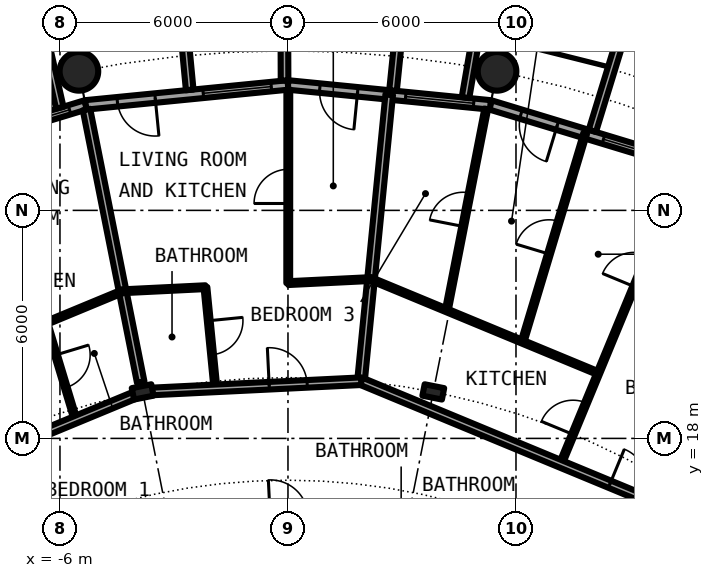
"""IFC4 building model, lengths in metres.
Left out: names, types, materials, properties, quantities, classifications, styles, units other than length and angle.
Written with IfcOpenShell. Run it as: python <this file> out.ifc"""

import sys

from ifc_helpers import new_model, si_unit, direction, frame, frame_2d, origin, origin_2d, place, context, subcontext, project, spatial, rectangle, circle, hollow_circle, i_section, extrude, element, fill, save


model = new_model("IFC4")
c1 = context("Model", 3, precision=1e-05, world=origin(), true_north=direction((0.0, 1.0)))
c2 = subcontext(c1, "Body", "Model", "MODEL_VIEW")
j1 = project(units=[si_unit("LENGTHUNIT", "METRE"), si_unit("PLANEANGLEUNIT", "RADIAN")], contexts=[c1])
p1 = place(None, origin())
s1 = spatial("IfcSite", under=j1, at=p1, CompositionType="ELEMENT")
p2 = place(p1, origin())
s2 = spatial("IfcBuilding", under=s1, at=p2, CompositionType="ELEMENT")
p3 = place(p2, frame((0.0, 0.0, 72.75)))
s3 = spatial("IfcBuildingStorey", under=s2, at=p3, CompositionType="ELEMENT", Elevation=72.75)
for number, where, z_axis, x_axis in (
    (1, (5.501, 27.658, 0.0), (0.0, 0.0, 1.0), (1.0, 0.0, 0.0)),
    (2, (-5.501, 27.658, 0.0), (0.0, 0.0, 1.0), (1.0, 0.0, 0.0)),
):
    element("IfcColumn", number, at=place(p3, frame(where, z_axis=z_axis, x_axis=x_axis)), inside=s3, PredefinedType="COLUMN", context=c2, shape_type="SweptSolid", body=[
        extrude(hollow_circle(Radius=0.508, WallThickness=0.04, at=origin_2d()), origin(), (0.0, 0.0, 1.0), 3.05),
    ])
for number, where, z_axis, x_axis in (
    (3, (3.824, 19.223, 0.0), (0.0, 0.0, 1.0), (0.195, 0.981, 0.0)),
    (4, (-3.824, 19.223, 0.0), (0.0, 0.0, 1.0), (-0.195, 0.981, 0.0)),
):
    element("IfcColumn", number, at=place(p3, frame(where, z_axis=z_axis, x_axis=x_axis)), inside=s3, PredefinedType="COLUMN", context=c2, shape_type="SweptSolid", body=[
        extrude(i_section(OverallWidth=0.306, OverallDepth=0.524, WebThickness=0.021, FlangeThickness=0.04, FilletRadius=0.027, at=origin_2d()), origin(), (0.0, 0.0, 1.0), 3.05),
    ])
p4 = place(p3, frame((10.447, 25.222, 0.0), z_axis=(0.0, 0.0, 1.0), x_axis=(-0.956965678721, 0.290201119486, 0.0)))
e5 = element("IfcWall", 5, at=p4, inside=s3, PredefinedType="SOLIDWALL", context=c2, shape_type="SweptSolid", body=[
    extrude(rectangle(XDim=5.351, YDim=0.25, at=frame_2d((2.676, 0.0))), origin(), (0.0, 0.0, 1.0), 2.7),
])
p5 = place(p4, frame((0.441, 0.0, 0.3)))
e6 = element("IfcOpeningElement", 6, at=p5, cuts=e5, PredefinedType="OPENING", context=c2, shape_type="SweptSolid", body=[
    extrude(rectangle(XDim=1.8, YDim=2.1, at=frame_2d((0.9, 1.05))), frame((0.0, 0.135, 0.0), z_axis=(0.0, -1.0, 0.0), x_axis=(1.0, 0.0, 0.0)), (0.0, 0.0, 1.0), 0.27),
])
p6 = place(p4, frame((3.51, 0.0, 0.0)))
e7 = element("IfcOpeningElement", 7, at=p6, cuts=e5, PredefinedType="OPENING", context=c2, shape_type="SweptSolid", body=[
    extrude(rectangle(XDim=1.0, YDim=2.2, at=frame_2d((0.5, 1.1))), frame((0.0, 0.135, 0.0), z_axis=(0.0, -1.0, 0.0), x_axis=(1.0, 0.0, 0.0)), (0.0, 0.0, 1.0), 0.27),
])
p7 = place(p3, frame((11.638, 28.084, -0.03), z_axis=(0.0, 0.0, 1.0), x_axis=(-0.941461077774, 0.337121697664, 0.0)))
e8 = element("IfcWall", 8, at=p7, inside=s3, PredefinedType="SOLIDWALL", context=c2, shape_type="SweptSolid", body=[
    extrude(rectangle(XDim=2.993, YDim=0.2, at=frame_2d((1.497, 0.0))), origin(), (0.0, 0.0, 1.0), 2.73),
])
p8 = place(p7, frame((0.457, 0.0, 0.33)))
e9 = element("IfcOpeningElement", 9, at=p8, cuts=e8, PredefinedType="OPENING", context=c2, shape_type="SweptSolid", body=[
    extrude(circle(Radius=1.04, at=frame_2d((1.04, 1.04))), frame((0.0, 0.11, 0.0), z_axis=(0.0, -1.0, 0.0), x_axis=(1.0, 0.0, 0.0)), (0.0, 0.0, 1.0), 0.22),
])
p9 = place(p3, frame((8.009, 26.092, -0.03), z_axis=(0.0, 0.0, 1.0), x_axis=(0.293406695073, 0.955987715029, 0.0)))
e10 = element("IfcWall", 10, at=p9, inside=s3, PredefinedType="SOLIDWALL", context=c2, shape_type="SweptSolid", body=[
    extrude(rectangle(XDim=3.006, YDim=0.2, at=frame_2d((1.503, 0.0))), origin(), (0.0, 0.0, 1.0), 2.73),
])
p10 = place(p3, frame((5.326, 26.775, 0.0), z_axis=(0.0, 0.0, 1.0), x_axis=(-0.995173996315, 0.098126026407, 0.0)))
e11 = element("IfcWall", 11, at=p10, inside=s3, PredefinedType="SOLIDWALL", context=c2, shape_type="SweptSolid", body=[
    extrude(rectangle(XDim=5.352, YDim=0.25, at=frame_2d((2.676, 0.0))), origin(), (0.0, 0.0, 1.0), 2.7),
])
p11 = place(p10, frame((0.441, 0.0, 0.3)))
e12 = element("IfcOpeningElement", 12, at=p11, cuts=e11, PredefinedType="OPENING", context=c2, shape_type="SweptSolid", body=[
    extrude(rectangle(XDim=1.8, YDim=2.1, at=frame_2d((0.9, 1.05))), frame((0.0, 0.135, 0.0), z_axis=(0.0, -1.0, 0.0), x_axis=(1.0, 0.0, 0.0)), (0.0, 0.0, 1.0), 0.27),
])
p12 = place(p10, frame((3.51, 0.0, 0.0)))
e13 = element("IfcOpeningElement", 13, at=p12, cuts=e11, PredefinedType="OPENING", context=c2, shape_type="SweptSolid", body=[
    extrude(rectangle(XDim=1.0, YDim=2.2, at=frame_2d((0.5, 1.1))), frame((0.0, 0.135, 0.0), z_axis=(0.0, -1.0, 0.0), x_axis=(1.0, 0.0, 0.0)), (0.0, 0.0, 1.0), 0.27),
])
p13 = place(p3, frame((4.671, 26.966, -0.03), z_axis=(0.0, 0.0, 1.0), x_axis=(0.170539878907, 0.985350774954, 0.0)))
e14 = element("IfcWall", 14, at=p13, inside=s3, PredefinedType="SOLIDWALL", context=c2, shape_type="SweptSolid", body=[
    extrude(rectangle(XDim=2.932, YDim=0.2, at=frame_2d((1.466, 0.0))), origin(), (0.0, 0.0, 1.0), 2.73),
])
p14 = place(p3, frame((2.764, 27.153, -0.03), z_axis=(0.0, 0.0, 1.0), x_axis=(0.101505487237, 0.994834979311, 0.0)))
e15 = element("IfcWall", 15, at=p14, inside=s3, PredefinedType="SOLIDWALL", context=c2, shape_type="SweptSolid", body=[
    extrude(rectangle(XDim=3.007, YDim=0.2, at=frame_2d((1.503, 0.0))), origin(), (0.0, 0.0, 1.0), 2.73),
])
p15 = place(p3, frame((0.0, 27.3, 0.0), z_axis=(0.0, 0.0, 1.0), x_axis=(-0.995173996315, -0.098126026407, 0.0)))
e16 = element("IfcWall", 16, at=p15, inside=s3, PredefinedType="SOLIDWALL", context=c2, shape_type="SweptSolid", body=[
    extrude(rectangle(XDim=5.352, YDim=0.25, at=frame_2d((2.676, 0.0))), origin(), (0.0, 0.0, 1.0), 2.7),
])
p16 = place(p15, frame((0.441, 0.0, 0.3)))
e17 = element("IfcOpeningElement", 17, at=p16, cuts=e16, PredefinedType="OPENING", context=c2, shape_type="SweptSolid", body=[
    extrude(rectangle(XDim=1.8, YDim=2.1, at=frame_2d((0.9, 1.05))), frame((0.0, 0.135, 0.0), z_axis=(0.0, -1.0, 0.0), x_axis=(1.0, 0.0, 0.0)), (0.0, 0.0, 1.0), 0.27),
])
p17 = place(p15, frame((3.51, 0.0, 0.0)))
e18 = element("IfcOpeningElement", 18, at=p17, cuts=e16, PredefinedType="OPENING", context=c2, shape_type="SweptSolid", body=[
    extrude(rectangle(XDim=1.0, YDim=2.2, at=frame_2d((0.5, 1.1))), frame((0.0, 0.135, 0.0), z_axis=(0.0, -1.0, 0.0), x_axis=(1.0, 0.0, 0.0)), (0.0, 0.0, 1.0), 0.27),
])
p18 = place(p3, frame((-0.09, 27.417, -0.03), z_axis=(0.0, 0.0, 1.0), x_axis=(-0.00347308367, 0.999993968827, 0.0)))
e19 = element("IfcWall", 19, at=p18, inside=s3, PredefinedType="SOLIDWALL", context=c2, shape_type="SweptSolid", body=[
    extrude(rectangle(XDim=2.882, YDim=0.2, at=frame_2d((1.441, 0.0))), origin(), (0.0, 0.0, 1.0), 2.73),
])
p19 = place(p3, frame((-2.586, 27.171, -0.03), z_axis=(0.0, 0.0, 1.0), x_axis=(-0.094548432284, 0.995520262954, 0.0)))
e20 = element("IfcWall", 20, at=p19, inside=s3, PredefinedType="SOLIDWALL", context=c2, shape_type="SweptSolid", body=[
    extrude(rectangle(XDim=3.006, YDim=0.2, at=frame_2d((1.503, 0.0))), origin(), (0.0, 0.0, 1.0), 2.73),
])
p20 = place(p3, frame((-5.326, 26.775, 0.0), z_axis=(0.0, 0.0, 1.0), x_axis=(-0.956965678721, -0.290201119486, 0.0)))
e21 = element("IfcWall", 21, at=p20, inside=s3, PredefinedType="SOLIDWALL", context=c2, shape_type="SweptSolid", body=[
    extrude(rectangle(XDim=5.351, YDim=0.25, at=frame_2d((2.676, 0.0))), origin(), (0.0, 0.0, 1.0), 2.7),
])
p21 = place(p20, frame((0.441, 0.0, 0.3)))
e22 = element("IfcOpeningElement", 22, at=p21, cuts=e21, PredefinedType="OPENING", context=c2, shape_type="SweptSolid", body=[
    extrude(rectangle(XDim=1.8, YDim=2.1, at=frame_2d((0.9, 1.05))), frame((0.0, 0.135, 0.0), z_axis=(0.0, -1.0, 0.0), x_axis=(1.0, 0.0, 0.0)), (0.0, 0.0, 1.0), 0.27),
])
p22 = place(p20, frame((3.51, 0.0, 0.0)))
e23 = element("IfcOpeningElement", 23, at=p22, cuts=e21, PredefinedType="OPENING", context=c2, shape_type="SweptSolid", body=[
    extrude(rectangle(XDim=1.0, YDim=2.2, at=frame_2d((0.5, 1.1))), frame((0.0, 0.135, 0.0), z_axis=(0.0, -1.0, 0.0), x_axis=(1.0, 0.0, 0.0)), (0.0, 0.0, 1.0), 0.27),
])
p23 = place(p3, frame((-6.004, 26.7, -0.03), z_axis=(0.0, 0.0, 1.0), x_axis=(-0.219609259383, 0.975587911566, 0.0)))
e24 = element("IfcWall", 24, at=p23, inside=s3, PredefinedType="SOLIDWALL", context=c2, shape_type="SweptSolid", body=[
    extrude(rectangle(XDim=2.933, YDim=0.2, at=frame_2d((1.466, 0.0))), origin(), (0.0, 0.0, 1.0), 2.73),
])
p24 = place(p3, frame((7.178, 17.328, 0.0), z_axis=(0.0, 0.0, 1.0), x_axis=(0.382458509789, 0.923972666419, 0.0)))
e25 = element("IfcWall", 25, at=p24, inside=s3, PredefinedType="PARTITIONING", context=c2, shape_type="SweptSolid", body=[
    extrude(rectangle(XDim=8.419, YDim=0.1, at=frame_2d((4.209, 0.0))), origin(), (0.0, 0.0, 1.0), 2.7),
])
p25 = place(p24, frame((0.841, 0.0, 0.0)))
e26 = element("IfcOpeningElement", 26, at=p25, cuts=e25, PredefinedType="OPENING", context=c2, shape_type="SweptSolid", body=[
    extrude(rectangle(XDim=0.9, YDim=2.3, at=frame_2d((0.45, 1.15))), frame((0.0, 0.06, 0.0), z_axis=(0.0, -1.0, 0.0), x_axis=(1.0, 0.0, 0.0)), (0.0, 0.0, 1.0), 0.12),
])
p26 = place(p24, frame((5.051, 0.0, 0.0)))
e27 = element("IfcOpeningElement", 27, at=p26, cuts=e25, PredefinedType="OPENING", context=c2, shape_type="SweptSolid", body=[
    extrude(rectangle(XDim=0.9, YDim=2.3, at=frame_2d((0.45, 1.15))), frame((0.0, 0.06, 0.0), z_axis=(0.0, -1.0, 0.0), x_axis=(1.0, 0.0, 0.0)), (0.0, 0.0, 1.0), 0.12),
])
p27 = place(p3, frame((-6.36, 21.039, 0.0), z_axis=(0.0, 0.0, 1.0), x_axis=(0.289375816213, -0.957215564537, 0.0)))
e28 = element("IfcWall", 28, at=p27, inside=s3, PredefinedType="PARTITIONING", context=c2, shape_type="SweptSolid", body=[
    extrude(rectangle(XDim=2.661, YDim=0.1, at=frame_2d((1.331, 0.0))), origin(), (0.0, 0.0, 1.0), 2.7),
])
p28 = place(p27, frame((0.88, 0.0, 0.0)))
e29 = element("IfcOpeningElement", 29, at=p28, cuts=e28, PredefinedType="OPENING", context=c2, shape_type="SweptSolid", body=[
    extrude(rectangle(XDim=0.9, YDim=2.3, at=frame_2d((0.45, 1.15))), frame((0.0, 0.06, 0.0), z_axis=(0.0, -1.0, 0.0), x_axis=(1.0, 0.0, 0.0)), (0.0, 0.0, 1.0), 0.12),
])
p29 = place(p3, frame((-5.302, 26.653, 0.0), z_axis=(0.0, 0.0, 1.0), x_axis=(0.195114589291, -0.98078045303, 0.0)))
e30 = element("IfcWall", 30, at=p29, inside=s3, PredefinedType="PARTITIONING", context=c2, shape_type="SweptSolid", body=[
    extrude(rectangle(XDim=7.314, YDim=0.2, at=frame_2d((3.657, 0.0))), origin(), (0.0, 0.0, 1.0), 2.7),
])
p30 = place(p3, frame((-2.172, 21.979, 0.0), z_axis=(0.0, 0.0, 1.0), x_axis=(0.098383180323, -0.995148606907, 0.0)))
e31 = element("IfcWall", 31, at=p30, inside=s3, PredefinedType="PARTITIONING", context=c2, shape_type="SweptSolid", body=[
    extrude(rectangle(XDim=2.675, YDim=0.1, at=frame_2d((1.337, 0.0))), origin(), (0.0, 0.0, 1.0), 2.7),
])
p31 = place(p30, frame((0.887, 0.0, 0.0)))
e32 = element("IfcOpeningElement", 32, at=p31, cuts=e31, PredefinedType="OPENING", context=c2, shape_type="SweptSolid", body=[
    extrude(rectangle(XDim=0.9, YDim=2.3, at=frame_2d((0.45, 1.15))), frame((0.0, 0.06, 0.0), z_axis=(0.0, -1.0, 0.0), x_axis=(1.0, 0.0, 0.0)), (0.0, 0.0, 1.0), 0.12),
])
p32 = place(p3, frame((0.007, 22.086, 0.0), z_axis=(0.0, 0.0, 1.0), x_axis=(0.000383785052, 0.999999926355, 0.0)))
e33 = element("IfcWall", 33, at=p32, inside=s3, PredefinedType="PARTITIONING", context=c2, shape_type="SweptSolid", body=[
    extrude(rectangle(XDim=5.089, YDim=0.1, at=frame_2d((2.544, 0.0))), origin(), (0.0, 0.0, 1.0), 2.7),
])
p33 = place(p32, frame((2.095, 0.0, 0.0)))
e34 = element("IfcOpeningElement", 34, at=p33, cuts=e33, PredefinedType="OPENING", context=c2, shape_type="SweptSolid", body=[
    extrude(rectangle(XDim=0.9, YDim=2.3, at=frame_2d((0.45, 1.15))), frame((0.0, 0.06, 0.0), z_axis=(0.0, -1.0, 0.0), x_axis=(1.0, 0.0, 0.0)), (0.0, 0.0, 1.0), 0.12),
])
p34 = place(p3, frame((1.921, 19.506, 0.0), z_axis=(0.0, 0.0, 1.0), x_axis=(0.098115395479, 0.995175044487, 0.0)))
e35 = element("IfcWall", 35, at=p34, inside=s3, PredefinedType="PARTITIONING", context=c2, shape_type="SweptSolid", body=[
    extrude(rectangle(XDim=7.574, YDim=0.2, at=frame_2d((3.787, 0.0))), origin(), (0.0, 0.0, 1.0), 2.7),
])
p35 = place(p3, frame((4.179, 21.367, 0.0), z_axis=(0.0, 0.0, 1.0), x_axis=(0.192109041462, 0.981373586453, 0.0)))
e36 = element("IfcWall", 36, at=p35, inside=s3, PredefinedType="PARTITIONING", context=c2, shape_type="SweptSolid", body=[
    extrude(rectangle(XDim=5.404, YDim=0.1, at=frame_2d((2.702, 0.0))), origin(), (0.0, 0.0, 1.0), 2.7),
])
p36 = place(p35, frame((2.252, 0.0, 0.0)))
e37 = element("IfcOpeningElement", 37, at=p36, cuts=e36, PredefinedType="OPENING", context=c2, shape_type="SweptSolid", body=[
    extrude(rectangle(XDim=0.9, YDim=2.3, at=frame_2d((0.45, 1.15))), frame((0.0, 0.06, 0.0), z_axis=(0.0, -1.0, 0.0), x_axis=(1.0, 0.0, 0.0)), (0.0, 0.0, 1.0), 0.12),
])
p37 = place(p3, frame((6.173, 20.541, 0.0), z_axis=(0.0, 0.0, 1.0), x_axis=(0.287793773423, 0.957692405723, 0.0)))
e38 = element("IfcWall", 38, at=p37, inside=s3, PredefinedType="PARTITIONING", context=c2, shape_type="SweptSolid", body=[
    extrude(rectangle(XDim=5.726, YDim=0.1, at=frame_2d((2.863, 0.0))), origin(), (0.0, 0.0, 1.0), 2.7),
])
p38 = place(p37, frame((2.413, 0.0, 0.0)))
e39 = element("IfcOpeningElement", 39, at=p38, cuts=e38, PredefinedType="OPENING", context=c2, shape_type="SweptSolid", body=[
    extrude(rectangle(XDim=0.9, YDim=2.3, at=frame_2d((0.45, 1.15))), frame((0.0, 0.06, 0.0), z_axis=(0.0, -1.0, 0.0), x_axis=(1.0, 0.0, 0.0)), (0.0, 0.0, 1.0), 0.12),
])
p39 = place(p3, frame((1.921, 19.506, 0.0), z_axis=(0.0, 0.0, 1.0), x_axis=(0.923845560554, -0.38276543763, 0.0)))
e40 = element("IfcWall", 40, at=p39, inside=s3, PredefinedType="PARTITIONING", context=c2, shape_type="SweptSolid", body=[
    extrude(rectangle(XDim=11.381, YDim=0.2, at=frame_2d((5.69, 0.0))), origin(), (0.0, 0.0, 1.0), 2.7),
])
p40 = place(p39, frame((7.087, 0.0, 0.0)))
e41 = element("IfcOpeningElement", 41, at=p40, cuts=e40, PredefinedType="OPENING", context=c2, shape_type="SweptSolid", body=[
    extrude(rectangle(XDim=1.0, YDim=2.3, at=frame_2d((0.5, 1.15))), frame((0.0, 0.11, 0.0), z_axis=(0.0, -1.0, 0.0), x_axis=(1.0, 0.0, 0.0)), (0.0, 0.0, 1.0), 0.22),
])
p41 = place(p3, frame((-10.745, 16.357, 0.0), z_axis=(0.0, 0.0, 1.0), x_axis=(0.923928411035, 0.382565407848, 0.0)))
e42 = element("IfcWall", 42, at=p41, inside=s3, PredefinedType="PARTITIONING", context=c2, shape_type="SweptSolid", body=[
    extrude(rectangle(XDim=7.335, YDim=0.2, at=frame_2d((3.667, 0.0))), origin(), (0.0, 0.0, 1.0), 2.38),
])
p42 = place(p41, frame((2.212, 0.0, 0.0)))
e43 = element("IfcOpeningElement", 43, at=p42, cuts=e42, PredefinedType="OPENING", context=c2, shape_type="SweptSolid", body=[
    extrude(rectangle(XDim=1.0, YDim=2.3, at=frame_2d((0.5, 1.15))), frame((0.0, 0.11, 0.0), z_axis=(0.0, -1.0, 0.0), x_axis=(1.0, 0.0, 0.0)), (0.0, 0.0, 1.0), 0.22),
])
p43 = place(p3, frame((-3.669, 19.231, 0.0), z_axis=(0.0, 0.0, 1.0), x_axis=(0.998803644396, 0.048900715146, 0.0)))
e44 = element("IfcWall", 44, at=p43, inside=s3, PredefinedType="PARTITIONING", context=c2, shape_type="SweptSolid", body=[
    extrude(rectangle(XDim=5.602, YDim=0.2, at=frame_2d((2.801, 0.0))), origin(), (0.0, 0.0, 1.0), 2.38),
])
p44 = place(p43, frame((3.179, 0.0, 0.0)))
e45 = element("IfcOpeningElement", 45, at=p44, cuts=e44, PredefinedType="OPENING", context=c2, shape_type="SweptSolid", body=[
    extrude(rectangle(XDim=1.0, YDim=2.3, at=frame_2d((0.5, 1.15))), frame((0.0, 0.11, 0.0), z_axis=(0.0, -1.0, 0.0), x_axis=(1.0, 0.0, 0.0)), (0.0, 0.0, 1.0), 0.22),
])
p45 = place(p3, frame((2.185, 22.193, 0.0), z_axis=(0.0, 0.0, 1.0), x_axis=(0.923844914631, -0.382766996632, 0.0)))
e46 = element("IfcWall", 46, at=p45, inside=s3, PredefinedType="PARTITIONING", context=c2, shape_type="SweptSolid", body=[
    extrude(rectangle(XDim=6.474, YDim=0.1, at=frame_2d((3.237, 0.0))), origin(), (0.0, 0.0, 1.0), 2.7),
])
p46 = place(p3, frame((-6.36, 21.039, 0.0), z_axis=(0.0, 0.0, 1.0), x_axis=(0.923743082263, 0.383012686436, 0.0)))
e47 = element("IfcWall", 47, at=p46, inside=s3, PredefinedType="PARTITIONING", context=c2, shape_type="SweptSolid", body=[
    extrude(rectangle(XDim=2.175, YDim=0.1, at=frame_2d((1.087, 0.0))), origin(), (0.0, 0.0, 1.0), 2.7),
])
for number, where, z_axis, x_axis in (
    (48, (-4.351, 21.872, 0.0), (0.0, 0.0, 1.0), (0.999, 0.049, 0.0)),
    (49, (0.007, 22.086, 0.0), (0.0, 0.0, 1.0), (0.999, 0.049, 0.0)),
):
    element("IfcWall", number, at=place(p3, frame(where, z_axis=z_axis, x_axis=x_axis)), inside=s3, PredefinedType="PARTITIONING", context=c2, shape_type="SweptSolid", body=[
        extrude(rectangle(XDim=2.182, YDim=0.1, at=frame_2d((1.091, 0.0))), origin(), (0.0, 0.0, 1.0), 2.7),
    ])
p47 = place(p5, origin())
e50 = element("IfcWindow", 50, at=p47, inside=s3, PartitioningType="SINGLE_PANEL", PredefinedType="WINDOW", context=c2, shape_type="SweptSolid", body=[
    extrude(rectangle(XDim=1.8, YDim=2.1, at=frame_2d((0.9, 1.05))), frame((0.0, 0.03, 0.0), z_axis=(0.0, -1.0, 0.0), x_axis=(1.0, 0.0, 0.0)), (0.0, 0.0, 1.0), 0.06),
])
fill(e6, e50)
p48 = place(p6, origin())
e51 = element("IfcDoor", 51, at=p48, inside=s3, OperationType="SINGLE_SWING_LEFT", PredefinedType="DOOR", context=c2, shape_type="SweptSolid", body=[
    extrude(rectangle(XDim=1.0, YDim=2.2, at=frame_2d((0.5, 1.1))), frame((0.0, 0.025, 0.0), z_axis=(0.0, -1.0, 0.0), x_axis=(1.0, 0.0, 0.0)), (0.0, 0.0, 1.0), 0.05),
])
fill(e7, e51)
p49 = place(p11, origin())
e52 = element("IfcWindow", 52, at=p49, inside=s3, PartitioningType="SINGLE_PANEL", PredefinedType="WINDOW", context=c2, shape_type="SweptSolid", body=[
    extrude(rectangle(XDim=1.8, YDim=2.1, at=frame_2d((0.9, 1.05))), frame((0.0, 0.03, 0.0), z_axis=(0.0, -1.0, 0.0), x_axis=(1.0, 0.0, 0.0)), (0.0, 0.0, 1.0), 0.06),
])
fill(e12, e52)
p50 = place(p12, origin())
e53 = element("IfcDoor", 53, at=p50, inside=s3, OperationType="SINGLE_SWING_LEFT", PredefinedType="DOOR", context=c2, shape_type="SweptSolid", body=[
    extrude(rectangle(XDim=1.0, YDim=2.2, at=frame_2d((0.5, 1.1))), frame((0.0, 0.025, 0.0), z_axis=(0.0, -1.0, 0.0), x_axis=(1.0, 0.0, 0.0)), (0.0, 0.0, 1.0), 0.05),
])
fill(e13, e53)
p51 = place(p16, origin())
e54 = element("IfcWindow", 54, at=p51, inside=s3, PartitioningType="SINGLE_PANEL", PredefinedType="WINDOW", context=c2, shape_type="SweptSolid", body=[
    extrude(rectangle(XDim=1.8, YDim=2.1, at=frame_2d((0.9, 1.05))), frame((0.0, 0.03, 0.0), z_axis=(0.0, -1.0, 0.0), x_axis=(1.0, 0.0, 0.0)), (0.0, 0.0, 1.0), 0.06),
])
fill(e17, e54)
p52 = place(p17, origin())
e55 = element("IfcDoor", 55, at=p52, inside=s3, OperationType="SINGLE_SWING_LEFT", PredefinedType="DOOR", context=c2, shape_type="SweptSolid", body=[
    extrude(rectangle(XDim=1.0, YDim=2.2, at=frame_2d((0.5, 1.1))), frame((0.0, 0.025, 0.0), z_axis=(0.0, -1.0, 0.0), x_axis=(1.0, 0.0, 0.0)), (0.0, 0.0, 1.0), 0.05),
])
fill(e18, e55)
p53 = place(p21, origin())
e56 = element("IfcWindow", 56, at=p53, inside=s3, PartitioningType="SINGLE_PANEL", PredefinedType="WINDOW", context=c2, shape_type="SweptSolid", body=[
    extrude(rectangle(XDim=1.8, YDim=2.1, at=frame_2d((0.9, 1.05))), frame((0.0, 0.03, 0.0), z_axis=(0.0, -1.0, 0.0), x_axis=(1.0, 0.0, 0.0)), (0.0, 0.0, 1.0), 0.06),
])
fill(e22, e56)
p54 = place(p40, origin())
e57 = element("IfcDoor", 57, at=p54, inside=s3, OperationType="SINGLE_SWING_RIGHT", PredefinedType="DOOR", context=c2, shape_type="SweptSolid", body=[
    extrude(rectangle(XDim=1.0, YDim=2.3, at=frame_2d((0.5, 1.15))), frame((0.0, 0.025, 0.0), z_axis=(0.0, -1.0, 0.0), x_axis=(1.0, 0.0, 0.0)), (0.0, 0.0, 1.0), 0.05),
])
fill(e41, e57)
p55 = place(p25, origin())
e58 = element("IfcDoor", 58, at=p55, inside=s3, OperationType="SINGLE_SWING_LEFT", PredefinedType="DOOR", context=c2, shape_type="SweptSolid", body=[
    extrude(rectangle(XDim=0.9, YDim=2.3, at=frame_2d((0.45, 1.15))), frame((0.0, 0.025, 0.0), z_axis=(0.0, -1.0, 0.0), x_axis=(1.0, 0.0, 0.0)), (0.0, 0.0, 1.0), 0.05),
])
fill(e26, e58)
p56 = place(p26, origin())
e59 = element("IfcDoor", 59, at=p56, inside=s3, OperationType="SINGLE_SWING_RIGHT", PredefinedType="DOOR", context=c2, shape_type="SweptSolid", body=[
    extrude(rectangle(XDim=0.9, YDim=2.3, at=frame_2d((0.45, 1.15))), frame((0.0, 0.025, 0.0), z_axis=(0.0, -1.0, 0.0), x_axis=(1.0, 0.0, 0.0)), (0.0, 0.0, 1.0), 0.05),
])
fill(e27, e59)
p57 = place(p38, origin())
e60 = element("IfcDoor", 60, at=p57, inside=s3, OperationType="SINGLE_SWING_RIGHT", PredefinedType="DOOR", context=c2, shape_type="SweptSolid", body=[
    extrude(rectangle(XDim=0.9, YDim=2.3, at=frame_2d((0.45, 1.15))), frame((0.0, 0.025, 0.0), z_axis=(0.0, -1.0, 0.0), x_axis=(1.0, 0.0, 0.0)), (0.0, 0.0, 1.0), 0.05),
])
fill(e39, e60)
p58 = place(p36, origin())
e61 = element("IfcDoor", 61, at=p58, inside=s3, OperationType="SINGLE_SWING_RIGHT", PredefinedType="DOOR", context=c2, shape_type="SweptSolid", body=[
    extrude(rectangle(XDim=0.9, YDim=2.3, at=frame_2d((0.45, 1.15))), frame((0.0, 0.025, 0.0), z_axis=(0.0, -1.0, 0.0), x_axis=(1.0, 0.0, 0.0)), (0.0, 0.0, 1.0), 0.05),
])
fill(e37, e61)
p59 = place(p44, origin())
e62 = element("IfcDoor", 62, at=p59, inside=s3, OperationType="SINGLE_SWING_RIGHT", PredefinedType="DOOR", context=c2, shape_type="SweptSolid", body=[
    extrude(rectangle(XDim=1.0, YDim=2.3, at=frame_2d((0.5, 1.15))), frame((0.0, 0.025, 0.0), z_axis=(0.0, -1.0, 0.0), x_axis=(1.0, 0.0, 0.0)), (0.0, 0.0, 1.0), 0.05),
])
fill(e45, e62)
p60 = place(p31, origin())
e63 = element("IfcDoor", 63, at=p60, inside=s3, OperationType="SINGLE_SWING_RIGHT", PredefinedType="DOOR", context=c2, shape_type="SweptSolid", body=[
    extrude(rectangle(XDim=0.9, YDim=2.3, at=frame_2d((0.45, 1.15))), frame((0.0, 0.025, 0.0), z_axis=(0.0, -1.0, 0.0), x_axis=(1.0, 0.0, 0.0)), (0.0, 0.0, 1.0), 0.05),
])
fill(e32, e63)
p61 = place(p33, origin())
e64 = element("IfcDoor", 64, at=p61, inside=s3, OperationType="SINGLE_SWING_RIGHT", PredefinedType="DOOR", context=c2, shape_type="SweptSolid", body=[
    extrude(rectangle(XDim=0.9, YDim=2.3, at=frame_2d((0.45, 1.15))), frame((0.0, 0.025, 0.0), z_axis=(0.0, -1.0, 0.0), x_axis=(1.0, 0.0, 0.0)), (0.0, 0.0, 1.0), 0.05),
])
fill(e34, e64)
p62 = place(p28, origin())
e65 = element("IfcDoor", 65, at=p62, inside=s3, OperationType="SINGLE_SWING_LEFT", PredefinedType="DOOR", context=c2, shape_type="SweptSolid", body=[
    extrude(rectangle(XDim=0.9, YDim=2.3, at=frame_2d((0.45, 1.15))), frame((0.0, 0.025, 0.0), z_axis=(0.0, -1.0, 0.0), x_axis=(1.0, 0.0, 0.0)), (0.0, 0.0, 1.0), 0.05),
])
fill(e29, e65)
save(model, sys.argv[1])
